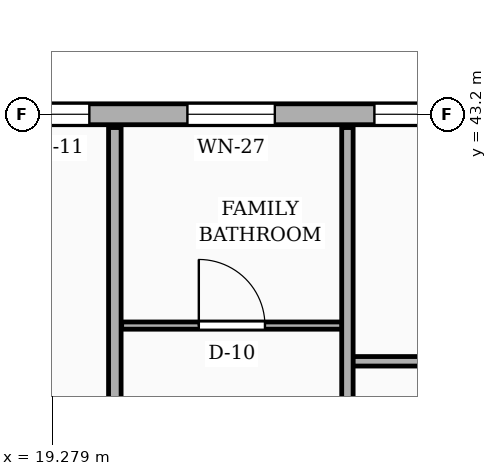
"""IFC4 building model, lengths in metres.
Left out: names, types, materials, properties, quantities, classifications, styles, units other than length and angle.
Written with IfcOpenShell. Run it as: python <this file> out.ifc"""

import sys

from ifc_helpers import new_model, si_unit, direction, frame, frame_2d, origin, place, context, subcontext, project, spatial, rectangle, extrude, element, fill, save


model = new_model("IFC4")
c1 = context("Model", 3, precision=1e-05, world=origin(), true_north=direction((0.0, 1.0)))
c2 = subcontext(c1, "Body", "Model", "MODEL_VIEW")
j1 = project(units=[si_unit("LENGTHUNIT", "METRE"), si_unit("PLANEANGLEUNIT", "RADIAN")], contexts=[c1])
p1 = place(None, origin())
s1 = spatial("IfcSite", under=j1, at=p1, CompositionType="ELEMENT")
p2 = place(p1, origin())
s2 = spatial("IfcBuilding", under=s1, at=p2, CompositionType="ELEMENT")
p3 = place(p2, frame((0.0, 0.0, 29.7)))
s3 = spatial("IfcBuildingStorey", under=s2, at=p3, CompositionType="ELEMENT", Elevation=29.7)
p4 = place(p3, frame((24.95, 43.2, 0.0), z_axis=(0.0, 0.0, 1.0), x_axis=(-1.0, 0.0, 0.0)))
e1 = element("IfcWall", 1, at=p4, inside=s3, PredefinedType="SOLIDWALL", context=c2, shape_type="SweptSolid", body=[
    extrude(rectangle(XDim=6.7, YDim=0.275, at=frame_2d((3.35, 0.0))), origin(), (0.0, 0.0, 1.0), 2.44),
])
p5 = place(p4, frame((0.495, 0.0, 0.78)))
e2 = element("IfcOpeningElement", 2, at=p5, cuts=e1, PredefinedType="OPENING", context=c2, shape_type="SweptSolid", body=[
    extrude(rectangle(XDim=0.94, YDim=1.44, at=frame_2d((0.47, 0.72))), frame((0.0, 0.147, 0.0), z_axis=(0.0, -1.0, 0.0), x_axis=(1.0, 0.0, 0.0)), (0.0, 0.0, 1.0), 0.295),
])
p6 = place(p4, frame((2.745, 0.0, 0.78)))
e3 = element("IfcOpeningElement", 3, at=p6, cuts=e1, PredefinedType="OPENING", context=c2, shape_type="SweptSolid", body=[
    extrude(rectangle(XDim=1.15, YDim=1.44, at=frame_2d((0.575, 0.72))), frame((0.0, 0.147, 0.0), z_axis=(0.0, -1.0, 0.0), x_axis=(1.0, 0.0, 0.0)), (0.0, 0.0, 1.0), 0.295),
])
p7 = place(p4, frame((5.185, 0.0, 0.78)))
e4 = element("IfcOpeningElement", 4, at=p7, cuts=e1, PredefinedType="OPENING", context=c2, shape_type="SweptSolid", body=[
    extrude(rectangle(XDim=1.04, YDim=1.26, at=frame_2d((0.52, 0.63))), frame((0.0, 0.147, 0.0), z_axis=(0.0, -1.0, 0.0), x_axis=(1.0, 0.0, 0.0)), (0.0, 0.0, 1.0), 0.295),
])
p8 = place(p3, frame((20.1, 36.02, 0.0), z_axis=(0.0, 0.0, 1.0), x_axis=(0.0, 1.0, 0.0)))
e5 = element("IfcWall", 5, at=p8, inside=s3, PredefinedType="PARTITIONING", context=c2, shape_type="SweptSolid", body=[
    extrude(rectangle(XDim=7.005, YDim=0.165, at=frame_2d((3.502, 0.0))), origin(), (0.0, 0.0, 1.0), 2.305),
])
p9 = place(p8, frame((1.33, 0.0, 0.0)))
e6 = element("IfcOpeningElement", 6, at=p9, cuts=e5, PredefinedType="OPENING", context=c2, shape_type="SweptSolid", body=[
    extrude(rectangle(XDim=0.94, YDim=2.12, at=frame_2d((0.47, 1.06))), frame((0.0, 0.093, 0.0), z_axis=(0.0, -1.0, 0.0), x_axis=(1.0, 0.0, 0.0)), (0.0, 0.0, 1.0), 0.185),
])
p10 = place(p3, frame((23.23, 39.95, 0.0), z_axis=(0.0, 0.0, 1.0), x_axis=(1.0, 0.0, 0.0)))
e7 = element("IfcWall", 7, at=p10, inside=s3, PredefinedType="PARTITIONING", context=c2, shape_type="SweptSolid", body=[
    extrude(rectangle(XDim=8.995, YDim=0.125, at=frame_2d((4.498, 0.0))), origin(), (0.0, 0.0, 1.0), 2.305),
])
p11 = place(p10, frame((4.058, 0.0, 0.0)))
e8 = element("IfcOpeningElement", 8, at=p11, cuts=e7, PredefinedType="OPENING", context=c2, shape_type="SweptSolid", body=[
    extrude(rectangle(XDim=0.88, YDim=2.08, at=frame_2d((0.44, 1.04))), frame((0.0, 0.073, 0.0), z_axis=(0.0, -1.0, 0.0), x_axis=(1.0, 0.0, 0.0)), (0.0, 0.0, 1.0), 0.145),
])
p12 = place(p3, frame((20.19, 40.42, 0.0), z_axis=(0.0, 0.0, 1.0), x_axis=(1.0, 0.0, 0.0)))
e9 = element("IfcWall", 9, at=p12, inside=s3, PredefinedType="PARTITIONING", context=c2, shape_type="SweptSolid", body=[
    extrude(rectangle(XDim=2.9, YDim=0.095, at=frame_2d((1.45, 0.0))), origin(), (0.0, 0.0, 1.0), 2.305),
])
p13 = place(p12, frame((1.015, 0.0, 0.0)))
e10 = element("IfcOpeningElement", 10, at=p13, cuts=e9, PredefinedType="OPENING", context=c2, shape_type="SweptSolid", body=[
    extrude(rectangle(XDim=0.87, YDim=2.05, at=frame_2d((0.435, 1.025))), frame((0.0, 0.058, 0.0), z_axis=(0.0, -1.0, 0.0), x_axis=(1.0, 0.0, 0.0)), (0.0, 0.0, 1.0), 0.115),
])
p14 = place(p3, frame((23.16, 36.14, 0.0), z_axis=(0.0, 0.0, 1.0), x_axis=(0.0, 1.0, 0.0)))
e11 = element("IfcWall", 11, at=p14, inside=s3, PredefinedType="PARTITIONING", context=c2, shape_type="SweptSolid", body=[
    extrude(rectangle(XDim=6.885, YDim=0.15, at=frame_2d((3.442, 0.0))), origin(), (0.0, 0.0, 1.0), 2.305),
])
p15 = place(p14, frame((1.31, 0.0, 0.0)))
e12 = element("IfcOpeningElement", 12, at=p15, cuts=e11, PredefinedType="OPENING", context=c2, shape_type="SweptSolid", body=[
    extrude(rectangle(XDim=0.92, YDim=2.1, at=frame_2d((0.46, 1.05))), frame((0.0, 0.085, 0.0), z_axis=(0.0, -1.0, 0.0), x_axis=(1.0, 0.0, 0.0)), (0.0, 0.0, 1.0), 0.17),
])
p16 = place(p5, origin())
e13 = element("IfcWindow", 13, at=p16, inside=s3, PartitioningType="SINGLE_PANEL", PredefinedType="WINDOW", context=c2, shape_type="SweptSolid", body=[
    extrude(rectangle(XDim=0.94, YDim=1.44, at=frame_2d((0.47, 0.72))), frame((0.0, 0.03, 0.0), z_axis=(0.0, -1.0, 0.0), x_axis=(1.0, 0.0, 0.0)), (0.0, 0.0, 1.0), 0.06),
])
fill(e2, e13)
p17 = place(p6, origin())
e14 = element("IfcWindow", 14, at=p17, inside=s3, PartitioningType="SINGLE_PANEL", PredefinedType="WINDOW", context=c2, shape_type="SweptSolid", body=[
    extrude(rectangle(XDim=1.15, YDim=1.44, at=frame_2d((0.575, 0.72))), frame((0.0, 0.03, 0.0), z_axis=(0.0, -1.0, 0.0), x_axis=(1.0, 0.0, 0.0)), (0.0, 0.0, 1.0), 0.06),
])
fill(e3, e14)
p18 = place(p7, origin())
e15 = element("IfcWindow", 15, at=p18, inside=s3, PartitioningType="SINGLE_PANEL", PredefinedType="WINDOW", context=c2, shape_type="SweptSolid", body=[
    extrude(rectangle(XDim=1.04, YDim=1.26, at=frame_2d((0.52, 0.63))), frame((0.0, 0.03, 0.0), z_axis=(0.0, -1.0, 0.0), x_axis=(1.0, 0.0, 0.0)), (0.0, 0.0, 1.0), 0.06),
])
fill(e4, e15)
p19 = place(p13, origin())
e16 = element("IfcDoor", 16, at=p19, inside=s3, OperationType="SINGLE_SWING_LEFT", PredefinedType="DOOR", context=c2, shape_type="SweptSolid", body=[
    extrude(rectangle(XDim=0.87, YDim=2.05, at=frame_2d((0.435, 1.025))), frame((0.0, 0.025, 0.0), z_axis=(0.0, -1.0, 0.0), x_axis=(1.0, 0.0, 0.0)), (0.0, 0.0, 1.0), 0.05),
])
fill(e10, e16)
save(model, sys.argv[1])
